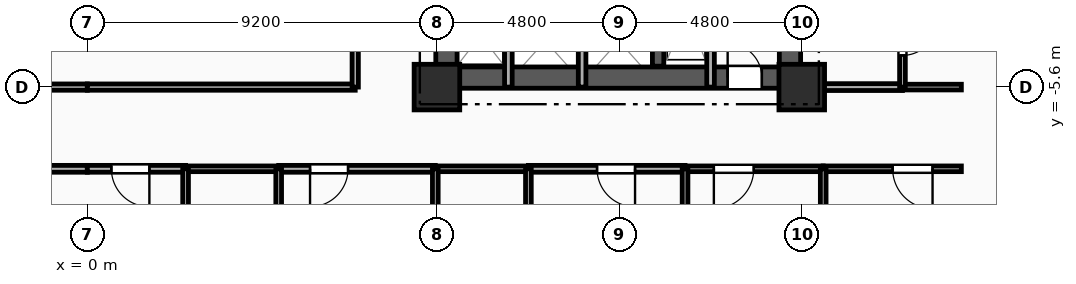
"""IFC4 building model, lengths in metres.
Left out: names, types, materials, properties, quantities, classifications, styles, units other than length and angle.
Written with IfcOpenShell. Run it as: python <this file> out.ifc"""

import sys

from ifc_helpers import new_model, si_unit, direction, frame, frame_2d, origin, origin_2d, place, context, subcontext, project, spatial, rectangle, extrude, element, fill, save


model = new_model("IFC4")
c1 = context("Model", 3, precision=1e-05, world=origin(), true_north=direction((0.0, 1.0)))
c2 = subcontext(c1, "Body", "Model", "MODEL_VIEW")
j1 = project(units=[si_unit("LENGTHUNIT", "METRE"), si_unit("PLANEANGLEUNIT", "RADIAN")], contexts=[c1])
p1 = place(None, origin())
s1 = spatial("IfcSite", under=j1, at=p1, CompositionType="ELEMENT")
p2 = place(p1, origin())
s2 = spatial("IfcBuilding", under=s1, at=p2, CompositionType="ELEMENT")
p3 = place(p2, frame((0.0, 0.0, 53.8)))
s3 = spatial("IfcBuildingStorey", under=s2, at=p3, CompositionType="ELEMENT", Elevation=53.8)
for number, where, z_axis, x_axis in (
    (1, (9.2, -5.6, 0.0), (0.0, 0.0, 1.0), (1.0, 0.0, 0.0)),
    (2, (18.8, -5.6, 0.0), (0.0, 0.0, 1.0), (1.0, 0.0, 0.0)),
):
    element("IfcColumn", number, at=place(p3, frame(where, z_axis=z_axis, x_axis=x_axis)), inside=s3, PredefinedType="COLUMN", context=c2, shape_type="SweptSolid", body=[
        extrude(rectangle(XDim=1.2, YDim=1.2, at=origin_2d()), origin(), (0.0, 0.0, 1.0), 3.35),
    ])
p4 = place(p3, frame((9.2, -5.35, 0.0), z_axis=(0.0, 0.0, 1.0), x_axis=(1.0, 0.0, 0.0)))
e3 = element("IfcWall", 3, at=p4, inside=s3, PredefinedType="SHEAR", context=c2, shape_type="SweptSolid", body=[
    extrude(rectangle(XDim=9.6, YDim=0.56, at=frame_2d((4.8, 0.0))), origin(), (0.0, 0.0, 1.0), 3.035),
])
p5 = place(p4, frame((7.65, 0.0, 0.0)))
e4 = element("IfcOpeningElement", 4, at=p5, cuts=e3, PredefinedType="OPENING", context=c2, shape_type="SweptSolid", body=[
    extrude(rectangle(XDim=0.9, YDim=2.1, at=frame_2d((0.45, 1.05))), frame((0.0, 0.29, 0.0), z_axis=(0.0, -1.0, 0.0), x_axis=(1.0, 0.0, 0.0)), (0.0, 0.0, 1.0), 0.58),
])
p6 = place(p3, frame((9.45, -5.05, 0.0), z_axis=(0.0, 0.0, 1.0), x_axis=(0.0, 1.0, 0.0)))
e5 = element("IfcWall", 5, at=p6, inside=s3, PredefinedType="SHEAR", context=c2, shape_type="SweptSolid", body=[
    extrude(rectangle(XDim=10.1, YDim=0.56, at=frame_2d((5.05, 0.0))), origin(), (0.0, 0.0, 1.0), 3.035),
])
p7 = place(p6, frame((7.15, 0.0, 0.0)))
e6 = element("IfcOpeningElement", 6, at=p7, cuts=e5, PredefinedType="OPENING", context=c2, shape_type="SweptSolid", body=[
    extrude(rectangle(XDim=0.9, YDim=2.1, at=frame_2d((0.45, 1.05))), frame((0.0, 0.29, 0.0), z_axis=(0.0, -1.0, 0.0), x_axis=(1.0, 0.0, 0.0)), (0.0, 0.0, 1.0), 0.58),
])
p8 = place(p6, frame((2.4, 0.0, 0.0)))
e7 = element("IfcOpeningElement", 7, at=p8, cuts=e5, PredefinedType="OPENING", context=c2, shape_type="SweptSolid", body=[
    extrude(rectangle(XDim=1.2, YDim=2.15, at=frame_2d((0.6, 1.075))), frame((0.0, 0.29, 0.0), z_axis=(0.0, -1.0, 0.0), x_axis=(1.0, 0.0, 0.0)), (0.0, 0.0, 1.0), 0.58),
])
p9 = place(p3, frame((18.49, -5.05, 0.0), z_axis=(0.0, 0.0, 1.0), x_axis=(0.0, 1.0, 0.0)))
e8 = element("IfcWall", 8, at=p9, inside=s3, PredefinedType="SHEAR", context=c2, shape_type="SweptSolid", body=[
    extrude(rectangle(XDim=10.1, YDim=0.56, at=frame_2d((5.05, 0.0))), origin(), (0.0, 0.0, 1.0), 3.035),
])
p10 = place(p3, frame((15.02, -5.05, 0.0), z_axis=(0.0, 0.0, 1.0), x_axis=(0.0, 1.0, 0.0)))
e9 = element("IfcWall", 9, at=p10, inside=s3, PredefinedType="SHEAR", context=c2, shape_type="SweptSolid", body=[
    extrude(rectangle(XDim=10.1, YDim=0.3, at=frame_2d((5.05, 0.0))), origin(), (0.0, 0.0, 1.0), 3.035),
])
p11 = place(p3, frame((16.4, -2.11, 0.0), z_axis=(0.0, 0.0, 1.0), x_axis=(0.0, -1.0, 0.0)))
e10 = element("IfcWall", 10, at=p11, inside=s3, PredefinedType="PARTITIONING", context=c2, shape_type="SweptSolid", body=[
    extrude(rectangle(XDim=3.49, YDim=0.2, at=frame_2d((1.745, 0.0))), origin(), (0.0, 0.0, 1.0), 3.035),
])
for number, where, z_axis, x_axis in (
    (11, (11.08, -5.6, 0.0), (0.0, 0.0, 1.0), (0.0, 1.0, 0.0)),
    (12, (13.02, -5.6, 0.0), (0.0, 0.0, 1.0), (0.0, 1.0, 0.0)),
):
    element("IfcWall", number, at=place(p3, frame(where, z_axis=z_axis, x_axis=x_axis)), inside=s3, PredefinedType="PARTITIONING", context=c2, shape_type="SweptSolid", body=[
        extrude(rectangle(XDim=2.25, YDim=0.2, at=frame_2d((1.125, 0.0))), origin(), (0.0, 0.0, 1.0), 3.035),
    ])
p12 = place(p3, frame((0.0, -7.75, 0.0), z_axis=(0.0, 0.0, 1.0), x_axis=(-1.0, 0.0, 0.0)))
e13 = element("IfcWall", 13, at=p12, inside=s3, PredefinedType="PARTITIONING", context=c2, shape_type="SweptSolid", body=[
    extrude(rectangle(XDim=1.536, YDim=0.18, at=frame_2d((0.768, 0.0))), origin(), (0.0, 0.0, 1.0), 3.035),
])
p13 = place(p3, frame((-7.05, -5.6, 0.0), z_axis=(0.0, 0.0, 1.0), x_axis=(1.0, 0.0, 0.0)))
e14 = element("IfcWall", 14, at=p13, inside=s3, PredefinedType="PARTITIONING", context=c2, shape_type="SweptSolid", body=[
    extrude(rectangle(XDim=7.05, YDim=0.165, at=frame_2d((3.525, 0.0))), origin(), (0.0, 0.0, 1.0), 2.52),
])
p14 = place(p13, frame((4.728, 0.0, 0.0)))
e15 = element("IfcOpeningElement", 15, at=p14, cuts=e14, PredefinedType="OPENING", context=c2, shape_type="SweptSolid", body=[
    extrude(rectangle(XDim=1.15, YDim=2.15, at=frame_2d((0.575, 1.075))), frame((0.0, 0.093, 0.0), z_axis=(0.0, -1.0, 0.0), x_axis=(1.0, 0.0, 0.0)), (0.0, 0.0, 1.0), 0.185),
])
p15 = place(p3, frame((18.8, -5.6, 0.0), z_axis=(0.0, 0.0, 1.0), x_axis=(1.0, 0.0, 0.0)))
e16 = element("IfcWall", 16, at=p15, inside=s3, PredefinedType="PARTITIONING", context=c2, shape_type="SweptSolid", body=[
    extrude(rectangle(XDim=2.65, YDim=0.18, at=frame_2d((1.325, 0.0))), origin(), (0.0, 0.0, 1.0), 3.035),
])
p16 = place(p3, frame((21.45, -5.6, 0.0), z_axis=(0.0, 0.0, 1.0), x_axis=(1.0, 0.0, 0.0)))
e17 = element("IfcWall", 17, at=p16, inside=s3, PredefinedType="PLUMBINGWALL", context=c2, shape_type="SweptSolid", body=[
    extrude(rectangle(XDim=1.55, YDim=0.15, at=frame_2d((0.775, 0.0))), origin(), (0.0, 0.0, 1.0), 3.035),
])
p17 = place(p3, frame((2.586, -7.75, 0.0), z_axis=(0.0, 0.0, 1.0), x_axis=(-1.0, 0.0, 0.0)))
e18 = element("IfcWall", 18, at=p17, inside=s3, PredefinedType="PARTITIONING", context=c2, shape_type="SweptSolid", body=[
    extrude(rectangle(XDim=2.586, YDim=0.18, at=frame_2d((1.293, 0.0))), origin(), (0.0, 0.0, 1.0), 3.035),
])
p18 = place(p17, frame((0.953, 0.0, 0.0)))
e19 = element("IfcOpeningElement", 19, at=p18, cuts=e18, PredefinedType="OPENING", context=c2, shape_type="SweptSolid", body=[
    extrude(rectangle(XDim=1.0, YDim=2.15, at=frame_2d((0.5, 1.075))), frame((0.0, 0.1, 0.0), z_axis=(0.0, -1.0, 0.0), x_axis=(1.0, 0.0, 0.0)), (0.0, 0.0, 1.0), 0.2),
])
p19 = place(p3, frame((9.157, -7.75, 0.0), z_axis=(0.0, 0.0, 1.0), x_axis=(-1.0, 0.0, 0.0)))
e20 = element("IfcWall", 20, at=p19, inside=s3, PredefinedType="PARTITIONING", context=c2, shape_type="SweptSolid", body=[
    extrude(rectangle(XDim=4.121, YDim=0.18, at=frame_2d((2.061, 0.0))), origin(), (0.0, 0.0, 1.0), 3.035),
])
p20 = place(p19, frame((2.296, 0.0, 0.0)))
e21 = element("IfcOpeningElement", 21, at=p20, cuts=e20, PredefinedType="OPENING", context=c2, shape_type="SweptSolid", body=[
    extrude(rectangle(XDim=1.0, YDim=2.15, at=frame_2d((0.5, 1.075))), frame((0.0, 0.1, 0.0), z_axis=(0.0, -1.0, 0.0), x_axis=(1.0, 0.0, 0.0)), (0.0, 0.0, 1.0), 0.2),
])
p21 = place(p3, frame((5.036, -7.75, 0.0), z_axis=(0.0, 0.0, 1.0), x_axis=(-1.0, 0.0, 0.0)))
e22 = element("IfcWall", 22, at=p21, inside=s3, PredefinedType="PLUMBINGWALL", context=c2, shape_type="SweptSolid", body=[
    extrude(rectangle(XDim=2.45, YDim=0.15, at=frame_2d((1.225, 0.0))), origin(), (0.0, 0.0, 1.0), 3.035),
])
p22 = place(p3, frame((15.729, -7.75, 0.0), z_axis=(0.0, 0.0, 1.0), x_axis=(-1.0, 0.0, 0.0)))
e23 = element("IfcWall", 23, at=p22, inside=s3, PredefinedType="PARTITIONING", context=c2, shape_type="SweptSolid", body=[
    extrude(rectangle(XDim=4.122, YDim=0.18, at=frame_2d((2.061, 0.0))), origin(), (0.0, 0.0, 1.0), 3.035),
])
p23 = place(p22, frame((1.316, 0.0, 0.0)))
e24 = element("IfcOpeningElement", 24, at=p23, cuts=e23, PredefinedType="OPENING", context=c2, shape_type="SweptSolid", body=[
    extrude(rectangle(XDim=1.0, YDim=2.15, at=frame_2d((0.5, 1.075))), frame((0.0, 0.1, 0.0), z_axis=(0.0, -1.0, 0.0), x_axis=(1.0, 0.0, 0.0)), (0.0, 0.0, 1.0), 0.2),
])
p24 = place(p3, frame((11.607, -7.75, 0.0), z_axis=(0.0, 0.0, 1.0), x_axis=(-1.0, 0.0, 0.0)))
e25 = element("IfcWall", 25, at=p24, inside=s3, PredefinedType="PLUMBINGWALL", context=c2, shape_type="SweptSolid", body=[
    extrude(rectangle(XDim=2.45, YDim=0.15, at=frame_2d((1.225, 0.0))), origin(), (0.0, 0.0, 1.0), 3.035),
])
p25 = place(p3, frame((19.365, -7.75, 0.0), z_axis=(0.0, 0.0, 1.0), x_axis=(-1.0, 0.0, 0.0)))
e26 = element("IfcWall", 26, at=p25, inside=s3, PredefinedType="PARTITIONING", context=c2, shape_type="SweptSolid", body=[
    extrude(rectangle(XDim=3.635, YDim=0.15, at=frame_2d((1.818, 0.0))), origin(), (0.0, 0.0, 1.0), 3.035),
])
p26 = place(p25, frame((1.827, 0.0, 0.0)))
e27 = element("IfcOpeningElement", 27, at=p26, cuts=e26, PredefinedType="OPENING", context=c2, shape_type="SweptSolid", body=[
    extrude(rectangle(XDim=1.05, YDim=2.15, at=frame_2d((0.525, 1.075))), frame((0.0, 0.085, 0.0), z_axis=(0.0, -1.0, 0.0), x_axis=(1.0, 0.0, 0.0)), (0.0, 0.0, 1.0), 0.17),
])
p27 = place(p3, frame((23.0, -7.75, 0.0), z_axis=(0.0, 0.0, 1.0), x_axis=(-1.0, 0.0, 0.0)))
e28 = element("IfcWall", 28, at=p27, inside=s3, PredefinedType="PARTITIONING", context=c2, shape_type="SweptSolid", body=[
    extrude(rectangle(XDim=3.635, YDim=0.15, at=frame_2d((1.818, 0.0))), origin(), (0.0, 0.0, 1.0), 3.035),
])
p28 = place(p27, frame((0.758, 0.0, 0.0)))
e29 = element("IfcOpeningElement", 29, at=p28, cuts=e28, PredefinedType="OPENING", context=c2, shape_type="SweptSolid", body=[
    extrude(rectangle(XDim=1.05, YDim=2.15, at=frame_2d((0.525, 1.075))), frame((0.0, 0.085, 0.0), z_axis=(0.0, -1.0, 0.0), x_axis=(1.0, 0.0, 0.0)), (0.0, 0.0, 1.0), 0.17),
])
p29 = place(p3, frame((0.0, -5.6, 0.0), z_axis=(0.0, 0.0, 1.0), x_axis=(1.0, 0.0, 0.0)))
e30 = element("IfcWall", 30, at=p29, inside=s3, PredefinedType="PARTITIONING", context=c2, shape_type="SweptSolid", body=[
    extrude(rectangle(XDim=7.05, YDim=0.165, at=frame_2d((3.525, 0.0))), origin(), (0.0, 0.0, 1.0), 2.52),
])
p30 = place(p3, frame((7.05, -5.6, 0.0), z_axis=(0.0, 0.0, 1.0), x_axis=(0.0, 1.0, 0.0)))
e31 = element("IfcWall", 31, at=p30, inside=s3, PredefinedType="PARTITIONING", context=c2, shape_type="SweptSolid", body=[
    extrude(rectangle(XDim=7.05, YDim=0.165, at=frame_2d((3.525, 0.0))), origin(), (0.0, 0.0, 1.0), 3.035),
])
p31 = place(p3, frame((21.45, -3.25, 0.0), z_axis=(0.0, 0.0, 1.0), x_axis=(0.0, -1.0, 0.0)))
e32 = element("IfcWall", 32, at=p31, inside=s3, PredefinedType="PLUMBINGWALL", context=c2, shape_type="SweptSolid", body=[
    extrude(rectangle(XDim=2.35, YDim=0.15, at=frame_2d((1.175, 0.0))), origin(), (0.0, 0.0, 1.0), 3.035),
])
p32 = place(p31, frame((0.616, 0.0, 0.0)))
e33 = element("IfcOpeningElement", 33, at=p32, cuts=e32, PredefinedType="OPENING", context=c2, shape_type="SweptSolid", body=[
    extrude(rectangle(XDim=0.9, YDim=2.1, at=frame_2d((0.45, 1.05))), frame((0.0, 0.085, 0.0), z_axis=(0.0, -1.0, 0.0), x_axis=(1.0, 0.0, 0.0)), (0.0, 0.0, 1.0), 0.17),
])
for number, where, z_axis, x_axis in (
    (34, (2.586, -7.75, 0.0), (0.0, 0.0, 1.0), (0.0, -1.0, 0.0)),
    (35, (5.036, -9.9, 0.0), (0.0, 0.0, 1.0), (0.0, 1.0, 0.0)),
):
    element("IfcWall", number, at=place(p3, frame(where, z_axis=z_axis, x_axis=x_axis)), inside=s3, PredefinedType="PLUMBINGWALL", context=c2, shape_type="SweptSolid", body=[
        extrude(rectangle(XDim=2.15, YDim=0.15, at=frame_2d((1.075, 0.0))), origin(), (0.0, 0.0, 1.0), 3.035),
    ])
p33 = place(p3, frame((9.157, -7.75, 0.0), z_axis=(0.0, 0.0, 1.0), x_axis=(0.0, -1.0, 0.0)))
e36 = element("IfcWall", 36, at=p33, inside=s3, PredefinedType="PLUMBINGWALL", context=c2, shape_type="SweptSolid", body=[
    extrude(rectangle(XDim=2.15, YDim=0.15, at=frame_2d((1.075, 0.0))), origin(), (0.0, 0.0, 1.0), 2.52),
])
p34 = place(p3, frame((11.607, -9.9, 0.0), z_axis=(0.0, 0.0, 1.0), x_axis=(0.0, 1.0, 0.0)))
e37 = element("IfcWall", 37, at=p34, inside=s3, PredefinedType="PLUMBINGWALL", context=c2, shape_type="SweptSolid", body=[
    extrude(rectangle(XDim=2.15, YDim=0.15, at=frame_2d((1.075, 0.0))), origin(), (0.0, 0.0, 1.0), 3.035),
])
for number, where, z_axis, x_axis in (
    (38, (15.729, -7.75, 0.0), (0.0, 0.0, 1.0), (0.0, -1.0, 0.0)),
    (39, (19.365, -7.75, 0.0), (0.0, 0.0, 1.0), (0.0, -1.0, 0.0)),
):
    element("IfcWall", number, at=place(p3, frame(where, z_axis=z_axis, x_axis=x_axis)), inside=s3, PredefinedType="PARTITIONING", context=c2, shape_type="SweptSolid", body=[
        extrude(rectangle(XDim=11.65, YDim=0.15, at=frame_2d((5.825, 0.0))), origin(), (0.0, 0.0, 1.0), 3.035),
    ])
p35 = place(p5, origin())
e40 = element("IfcDoor", 40, at=p35, inside=s3, OperationType="SINGLE_SWING_LEFT", PredefinedType="DOOR", context=c2, shape_type="SweptSolid", body=[
    extrude(rectangle(XDim=0.9, YDim=2.1, at=frame_2d((0.45, 1.05))), frame((0.0, 0.025, 0.0), z_axis=(0.0, -1.0, 0.0), x_axis=(1.0, 0.0, 0.0)), (0.0, 0.0, 1.0), 0.05),
])
fill(e4, e40)
p36 = place(p18, origin())
e41 = element("IfcDoor", 41, at=p36, inside=s3, OperationType="SINGLE_SWING_LEFT", PredefinedType="DOOR", context=c2, shape_type="SweptSolid", body=[
    extrude(rectangle(XDim=1.0, YDim=2.15, at=frame_2d((0.5, 1.075))), frame((0.0, 0.025, 0.0), z_axis=(0.0, -1.0, 0.0), x_axis=(1.0, 0.0, 0.0)), (0.0, 0.0, 1.0), 0.05),
])
fill(e19, e41)
p37 = place(p20, origin())
e42 = element("IfcDoor", 42, at=p37, inside=s3, OperationType="SINGLE_SWING_RIGHT", PredefinedType="DOOR", context=c2, shape_type="SweptSolid", body=[
    extrude(rectangle(XDim=1.0, YDim=2.15, at=frame_2d((0.5, 1.075))), frame((0.0, 0.025, 0.0), z_axis=(0.0, -1.0, 0.0), x_axis=(1.0, 0.0, 0.0)), (0.0, 0.0, 1.0), 0.05),
])
fill(e21, e42)
p38 = place(p23, origin())
e43 = element("IfcDoor", 43, at=p38, inside=s3, OperationType="SINGLE_SWING_LEFT", PredefinedType="DOOR", context=c2, shape_type="SweptSolid", body=[
    extrude(rectangle(XDim=1.0, YDim=2.15, at=frame_2d((0.5, 1.075))), frame((0.0, 0.025, 0.0), z_axis=(0.0, -1.0, 0.0), x_axis=(1.0, 0.0, 0.0)), (0.0, 0.0, 1.0), 0.05),
])
fill(e24, e43)
p39 = place(p26, origin())
e44 = element("IfcDoor", 44, at=p39, inside=s3, OperationType="SINGLE_SWING_RIGHT", PredefinedType="DOOR", context=c2, shape_type="SweptSolid", body=[
    extrude(rectangle(XDim=1.05, YDim=2.15, at=frame_2d((0.525, 1.075))), frame((0.0, 0.025, 0.0), z_axis=(0.0, -1.0, 0.0), x_axis=(1.0, 0.0, 0.0)), (0.0, 0.0, 1.0), 0.05),
])
fill(e27, e44)
p40 = place(p28, origin())
e45 = element("IfcDoor", 45, at=p40, inside=s3, OperationType="SINGLE_SWING_LEFT", PredefinedType="DOOR", context=c2, shape_type="SweptSolid", body=[
    extrude(rectangle(XDim=1.05, YDim=2.15, at=frame_2d((0.525, 1.075))), frame((0.0, 0.025, 0.0), z_axis=(0.0, -1.0, 0.0), x_axis=(1.0, 0.0, 0.0)), (0.0, 0.0, 1.0), 0.05),
])
fill(e29, e45)
p41 = place(p32, origin())
e46 = element("IfcDoor", 46, at=p41, inside=s3, OperationType="SINGLE_SWING_LEFT", PredefinedType="DOOR", context=c2, shape_type="SweptSolid", body=[
    extrude(rectangle(XDim=0.9, YDim=2.1, at=frame_2d((0.45, 1.05))), frame((0.0, 0.025, 0.0), z_axis=(0.0, -1.0, 0.0), x_axis=(1.0, 0.0, 0.0)), (0.0, 0.0, 1.0), 0.05),
])
fill(e33, e46)
save(model, sys.argv[1])
